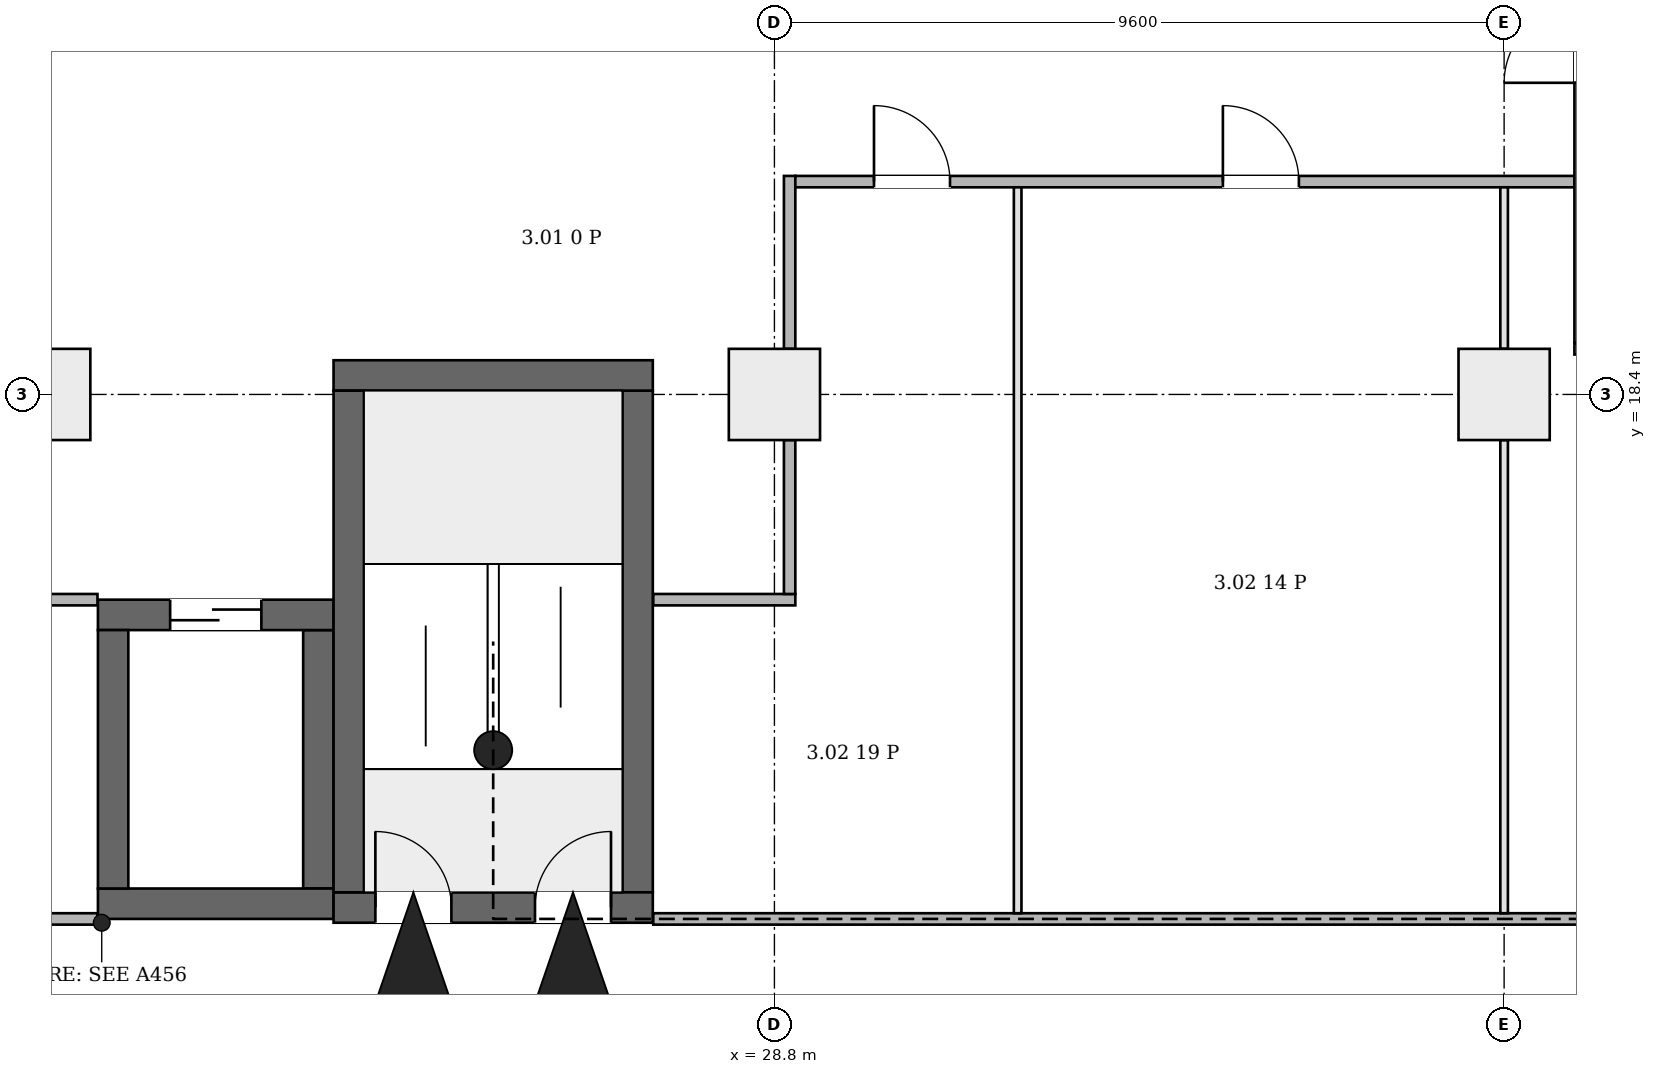
"""IFC4 building model, lengths in metres.
Left out: names, types, materials, properties, quantities, classifications, styles, units other than length and angle.
Written with IfcOpenShell. Run it as: python <this file> out.ifc"""

import sys

from ifc_helpers import new_model, si_unit, direction, frame, frame_2d, origin, origin_2d, place, context, subcontext, project, spatial, rectangle, extrude, element, fill, save


model = new_model("IFC4")
c1 = context("Model", 3, precision=1e-05, world=origin(), true_north=direction((0.0, 1.0)))
c2 = subcontext(c1, "Body", "Model", "MODEL_VIEW")
j1 = project(units=[si_unit("LENGTHUNIT", "METRE"), si_unit("PLANEANGLEUNIT", "RADIAN")], contexts=[c1])
p1 = place(None, origin())
s1 = spatial("IfcSite", under=j1, at=p1, CompositionType="ELEMENT")
p2 = place(p1, origin())
s2 = spatial("IfcBuilding", under=s1, at=p2, CompositionType="ELEMENT")
p3 = place(p2, frame((0.0, 0.0, 21.7)))
s3 = spatial("IfcBuildingStorey", under=s2, at=p3, CompositionType="ELEMENT", Elevation=21.7)
p4 = place(p3, frame((23.0, 11.65, 0.0), z_axis=(0.0, 0.0, 1.0), x_axis=(1.0, 0.0, 0.0)))
e1 = element("IfcWall", 1, at=p4, inside=s3, PredefinedType="SHEAR", context=c2, shape_type="SweptSolid", body=[
    extrude(rectangle(XDim=4.2, YDim=0.4, at=frame_2d((2.1, 0.0))), origin(), (0.0, 0.0, 1.0), 5.0),
])
p5 = place(p4, frame((0.55, 0.0, 0.0)))
e2 = element("IfcOpeningElement", 2, at=p5, cuts=e1, PredefinedType="OPENING", context=c2, shape_type="SweptSolid", body=[
    extrude(rectangle(XDim=1.0, YDim=2.1, at=frame_2d((0.5, 1.05))), frame((0.0, 0.21, 0.0), z_axis=(0.0, -1.0, 0.0), x_axis=(1.0, 0.0, 0.0)), (0.0, 0.0, 1.0), 0.42),
])
p6 = place(p4, frame((2.65, 0.0, 0.0)))
e3 = element("IfcOpeningElement", 3, at=p6, cuts=e1, PredefinedType="OPENING", context=c2, shape_type="SweptSolid", body=[
    extrude(rectangle(XDim=1.0, YDim=2.1, at=frame_2d((0.5, 1.05))), frame((0.0, 0.21, 0.0), z_axis=(0.0, -1.0, 0.0), x_axis=(1.0, 0.0, 0.0)), (0.0, 0.0, 1.0), 0.42),
])
p7 = place(p3, frame((23.0, 18.65, 0.0), z_axis=(0.0, 0.0, 1.0), x_axis=(1.0, 0.0, 0.0)))
e4 = element("IfcWall", 4, at=p7, inside=s3, PredefinedType="SHEAR", context=c2, shape_type="SweptSolid", body=[
    extrude(rectangle(XDim=4.2, YDim=0.4, at=frame_2d((2.1, 0.0))), origin(), (0.0, 0.0, 1.0), 5.0),
])
for number, where, z_axis, x_axis in (
    (5, (23.2, 11.85, 0.0), (0.0, 0.0, 1.0), (0.0, 1.0, 0.0)),
    (6, (27.0, 11.85, 0.0), (0.0, 0.0, 1.0), (0.0, 1.0, 0.0)),
):
    element("IfcWall", number, at=place(p3, frame(where, z_axis=z_axis, x_axis=x_axis)), inside=s3, PredefinedType="SHEAR", context=c2, shape_type="SweptSolid", body=[
        extrude(rectangle(XDim=6.6, YDim=0.4, at=frame_2d((3.3, 0.0))), origin(), (0.0, 0.0, 1.0), 5.0),
    ])
p8 = place(p3, frame((19.9, 11.7, 0.0), z_axis=(0.0, 0.0, 1.0), x_axis=(1.0, 0.0, 0.0)))
e7 = element("IfcWall", 7, at=p8, inside=s3, PredefinedType="SHEAR", context=c2, shape_type="SweptSolid", body=[
    extrude(rectangle(XDim=3.1, YDim=0.4, at=frame_2d((1.55, 0.0))), origin(), (0.0, 0.0, 1.0), 5.0),
])
p9 = place(p3, frame((19.9, 15.5, 0.0), z_axis=(0.0, 0.0, 1.0), x_axis=(1.0, 0.0, 0.0)))
e8 = element("IfcWall", 8, at=p9, inside=s3, PredefinedType="SHEAR", context=c2, shape_type="SweptSolid", body=[
    extrude(rectangle(XDim=3.1, YDim=0.4, at=frame_2d((1.55, 0.0))), origin(), (0.0, 0.0, 1.0), 5.0),
])
p10 = place(p9, frame((0.95, 0.0, 0.0)))
e9 = element("IfcOpeningElement", 9, at=p10, cuts=e8, PredefinedType="OPENING", context=c2, shape_type="SweptSolid", body=[
    extrude(rectangle(XDim=1.2, YDim=2.1, at=frame_2d((0.6, 1.05))), frame((0.0, 0.21, 0.0), z_axis=(0.0, -1.0, 0.0), x_axis=(1.0, 0.0, 0.0)), (0.0, 0.0, 1.0), 0.42),
])
for number, where, z_axis, x_axis in (
    (10, (20.1, 11.9, 0.0), (0.0, 0.0, 1.0), (0.0, 1.0, 0.0)),
    (11, (22.8, 11.9, 0.0), (0.0, 0.0, 1.0), (0.0, 1.0, 0.0)),
):
    element("IfcWall", number, at=place(p3, frame(where, z_axis=z_axis, x_axis=x_axis)), inside=s3, PredefinedType="SHEAR", context=c2, shape_type="SweptSolid", body=[
        extrude(rectangle(XDim=3.4, YDim=0.4, at=frame_2d((1.7, 0.0))), origin(), (0.0, 0.0, 1.0), 5.0),
    ])
for number, where, z_axis, x_axis in (
    (12, (19.2, 18.4, 0.0), (0.0, 0.0, 1.0), (1.0, 0.0, 0.0)),
    (13, (28.8, 18.4, 0.0), (0.0, 0.0, 1.0), (1.0, 0.0, 0.0)),
    (14, (38.4, 18.4, 0.0), (0.0, 0.0, 1.0), (1.0, 0.0, 0.0)),
):
    element("IfcColumn", number, at=place(p3, frame(where, z_axis=z_axis, x_axis=x_axis)), inside=s3, PredefinedType="COLUMN", context=c2, shape_type="SweptSolid", body=[
        extrude(rectangle(XDim=1.2, YDim=1.2, at=origin_2d()), origin(), (0.0, 0.0, 1.0), 5.0),
    ])
p11 = place(p3, frame((10.325, 11.5, 0.0), z_axis=(0.0, 0.0, 1.0), x_axis=(1.0, 0.0, 0.0)))
e15 = element("IfcWall", 15, at=p11, inside=s3, PredefinedType="PARTITIONING", context=c2, shape_type="SweptSolid", body=[
    extrude(rectangle(XDim=9.569, YDim=0.15, at=frame_2d((4.785, 0.0))), origin(), (0.0, 0.0, 1.0), 4.65),
])
p12 = place(p3, frame((16.206, 15.7, 0.0), z_axis=(0.0, 0.0, 1.0), x_axis=(1.0, 0.0, 0.0)))
e16 = element("IfcWall", 16, at=p12, inside=s3, PredefinedType="PARTITIONING", context=c2, shape_type="SweptSolid", body=[
    extrude(rectangle(XDim=3.688, YDim=0.15, at=frame_2d((1.844, 0.0))), origin(), (0.0, 0.0, 1.0), 4.65),
])
p13 = place(p3, frame((27.206, 11.5, 0.0), z_axis=(0.0, 0.0, 1.0), x_axis=(1.0, 0.0, 0.0)))
e17 = element("IfcWall", 17, at=p13, inside=s3, PredefinedType="PARTITIONING", context=c2, shape_type="SweptSolid", body=[
    extrude(rectangle(XDim=24.069, YDim=0.15, at=frame_2d((12.034, 0.0))), origin(), (0.0, 0.0, 1.0), 4.65),
])
p14 = place(p13, frame((13.894, 0.0, 0.0)))
e18 = element("IfcOpeningElement", 18, at=p14, cuts=e17, PredefinedType="OPENING", context=c2, shape_type="SweptSolid", body=[
    extrude(rectangle(XDim=1.0, YDim=2.1, at=frame_2d((0.5, 1.05))), frame((0.0, 0.085, 0.0), z_axis=(0.0, -1.0, 0.0), x_axis=(1.0, 0.0, 0.0)), (0.0, 0.0, 1.0), 0.17),
])
p15 = place(p13, frame((20.259, 0.0, 0.0)))
e19 = element("IfcOpeningElement", 19, at=p15, cuts=e17, PredefinedType="OPENING", context=c2, shape_type="SweptSolid", body=[
    extrude(rectangle(XDim=1.0, YDim=2.1, at=frame_2d((0.5, 1.05))), frame((0.0, 0.085, 0.0), z_axis=(0.0, -1.0, 0.0), x_axis=(1.0, 0.0, 0.0)), (0.0, 0.0, 1.0), 0.17),
])
p16 = place(p3, frame((27.206, 15.7, 0.0), z_axis=(0.0, 0.0, 1.0), x_axis=(1.0, 0.0, 0.0)))
e20 = element("IfcWall", 20, at=p16, inside=s3, PredefinedType="PARTITIONING", context=c2, shape_type="SweptSolid", body=[
    extrude(rectangle(XDim=1.869, YDim=0.15, at=frame_2d((0.935, 0.0))), origin(), (0.0, 0.0, 1.0), 4.65),
])
p17 = place(p3, frame((29.0, 15.775, 0.0), z_axis=(0.0, 0.0, 1.0), x_axis=(0.0, 1.0, 0.0)))
e21 = element("IfcWall", 21, at=p17, inside=s3, PredefinedType="PARTITIONING", context=c2, shape_type="SweptSolid", body=[
    extrude(rectangle(XDim=2.025, YDim=0.15, at=frame_2d((1.013, 0.0))), origin(), (0.0, 0.0, 1.0), 4.25),
])
p18 = place(p3, frame((29.0, 19.0, 0.0), z_axis=(0.0, 0.0, 1.0), x_axis=(0.0, 1.0, 0.0)))
e22 = element("IfcWall", 22, at=p18, inside=s3, PredefinedType="PARTITIONING", context=c2, shape_type="SweptSolid", body=[
    extrude(rectangle(XDim=2.275, YDim=0.15, at=frame_2d((1.137, 0.0))), origin(), (0.0, 0.0, 1.0), 4.25),
])
p19 = place(p3, frame((29.075, 21.2, 0.0), z_axis=(0.0, 0.0, 1.0), x_axis=(1.0, 0.0, 0.0)))
e23 = element("IfcWall", 23, at=p19, inside=s3, PredefinedType="PARTITIONING", context=c2, shape_type="SweptSolid", body=[
    extrude(rectangle(XDim=10.25, YDim=0.15, at=frame_2d((5.125, 0.0))), origin(), (0.0, 0.0, 1.0), 4.65),
])
p20 = place(p19, frame((1.035, 0.0, 0.0)))
e24 = element("IfcOpeningElement", 24, at=p20, cuts=e23, PredefinedType="OPENING", context=c2, shape_type="SweptSolid", body=[
    extrude(rectangle(XDim=1.0, YDim=2.1, at=frame_2d((0.5, 1.05))), frame((0.0, 0.085, 0.0), z_axis=(0.0, -1.0, 0.0), x_axis=(1.0, 0.0, 0.0)), (0.0, 0.0, 1.0), 0.17),
])
p21 = place(p19, frame((5.625, 0.0, 0.0)))
e25 = element("IfcOpeningElement", 25, at=p21, cuts=e23, PredefinedType="OPENING", context=c2, shape_type="SweptSolid", body=[
    extrude(rectangle(XDim=1.0, YDim=2.1, at=frame_2d((0.5, 1.05))), frame((0.0, 0.085, 0.0), z_axis=(0.0, -1.0, 0.0), x_axis=(1.0, 0.0, 0.0)), (0.0, 0.0, 1.0), 0.17),
])
p22 = place(p3, frame((32.0, 11.575, 0.0), z_axis=(0.0, 0.0, 1.0), x_axis=(0.0, 1.0, 0.0)))
e26 = element("IfcWall", 26, at=p22, inside=s3, PredefinedType="PARTITIONING", context=c2, shape_type="SweptSolid", body=[
    extrude(rectangle(XDim=9.55, YDim=0.1, at=frame_2d((4.775, 0.0))), origin(), (0.0, 0.0, 1.0), 4.65),
])
p23 = place(p3, frame((38.4, 11.575, 0.0), z_axis=(0.0, 0.0, 1.0), x_axis=(0.0, 1.0, 0.0)))
e27 = element("IfcWall", 27, at=p23, inside=s3, PredefinedType="PARTITIONING", context=c2, shape_type="SweptSolid", body=[
    extrude(rectangle(XDim=6.225, YDim=0.1, at=frame_2d((3.113, 0.0))), origin(), (0.0, 0.0, 1.0), 4.25),
])
p24 = place(p3, frame((38.4, 19.0, 0.0), z_axis=(0.0, 0.0, 1.0), x_axis=(0.0, 1.0, 0.0)))
e28 = element("IfcWall", 28, at=p24, inside=s3, PredefinedType="PARTITIONING", context=c2, shape_type="SweptSolid", body=[
    extrude(rectangle(XDim=2.125, YDim=0.1, at=frame_2d((1.062, 0.0))), origin(), (0.0, 0.0, 1.0), 4.25),
])
p25 = place(p3, frame((39.325, 19.0, 0.0), z_axis=(0.0, 0.0, 1.0), x_axis=(1.0, 0.0, 0.0)))
e29 = element("IfcWall", 29, at=p25, inside=s3, PredefinedType="PARTITIONING", context=c2, shape_type="SweptSolid", body=[
    extrude(rectangle(XDim=8.075, YDim=0.15, at=frame_2d((4.038, 0.0))), origin(), (0.0, 0.0, 1.0), 4.65),
])
p26 = place(p3, frame((39.4, 19.075, 0.0), z_axis=(0.0, 0.0, 1.0), x_axis=(0.0, 1.0, 0.0)))
e30 = element("IfcWall", 30, at=p26, inside=s3, PredefinedType="PARTITIONING", context=c2, shape_type="SweptSolid", body=[
    extrude(rectangle(XDim=8.0, YDim=0.15, at=frame_2d((4.0, 0.0))), origin(), (0.0, 0.0, 1.0), 4.65),
])
p27 = place(p26, frame((3.425, 0.0, 0.0)))
e31 = element("IfcOpeningElement", 31, at=p27, cuts=e30, PredefinedType="OPENING", context=c2, shape_type="SweptSolid", body=[
    extrude(rectangle(XDim=1.0, YDim=2.1, at=frame_2d((0.5, 1.05))), frame((0.0, 0.085, 0.0), z_axis=(0.0, -1.0, 0.0), x_axis=(1.0, 0.0, 0.0)), (0.0, 0.0, 1.0), 0.17),
])
p28 = place(p5, origin())
e32 = element("IfcDoor", 32, at=p28, inside=s3, OperationType="SINGLE_SWING_RIGHT", PredefinedType="DOOR", context=c2, shape_type="SweptSolid", body=[
    extrude(rectangle(XDim=1.0, YDim=2.1, at=frame_2d((0.5, 1.05))), frame((0.0, 0.025, 0.0), z_axis=(0.0, -1.0, 0.0), x_axis=(1.0, 0.0, 0.0)), (0.0, 0.0, 1.0), 0.05),
])
fill(e2, e32)
p29 = place(p6, origin())
e33 = element("IfcDoor", 33, at=p29, inside=s3, OperationType="SINGLE_SWING_LEFT", PredefinedType="DOOR", context=c2, shape_type="SweptSolid", body=[
    extrude(rectangle(XDim=1.0, YDim=2.1, at=frame_2d((0.5, 1.05))), frame((0.0, 0.025, 0.0), z_axis=(0.0, -1.0, 0.0), x_axis=(1.0, 0.0, 0.0)), (0.0, 0.0, 1.0), 0.05),
])
fill(e3, e33)
p30 = place(p10, origin())
e34 = element("IfcDoor", 34, at=p30, inside=s3, OperationType="DOUBLE_DOOR_SLIDING", PredefinedType="DOOR", context=c2, shape_type="SweptSolid", body=[
    extrude(rectangle(XDim=1.2, YDim=2.1, at=frame_2d((0.6, 1.05))), frame((0.0, 0.025, 0.0), z_axis=(0.0, -1.0, 0.0), x_axis=(1.0, 0.0, 0.0)), (0.0, 0.0, 1.0), 0.05),
])
fill(e9, e34)
p31 = place(p20, origin())
e35 = element("IfcDoor", 35, at=p31, inside=s3, OperationType="SINGLE_SWING_RIGHT", PredefinedType="DOOR", context=c2, shape_type="SweptSolid", body=[
    extrude(rectangle(XDim=1.0, YDim=2.1, at=frame_2d((0.5, 1.05))), frame((0.0, 0.025, 0.0), z_axis=(0.0, -1.0, 0.0), x_axis=(1.0, 0.0, 0.0)), (0.0, 0.0, 1.0), 0.05),
])
fill(e24, e35)
p32 = place(p21, origin())
e36 = element("IfcDoor", 36, at=p32, inside=s3, OperationType="SINGLE_SWING_LEFT", PredefinedType="DOOR", context=c2, shape_type="SweptSolid", body=[
    extrude(rectangle(XDim=1.0, YDim=2.1, at=frame_2d((0.5, 1.05))), frame((0.0, 0.025, 0.0), z_axis=(0.0, -1.0, 0.0), x_axis=(1.0, 0.0, 0.0)), (0.0, 0.0, 1.0), 0.05),
])
fill(e25, e36)
save(model, sys.argv[1])
